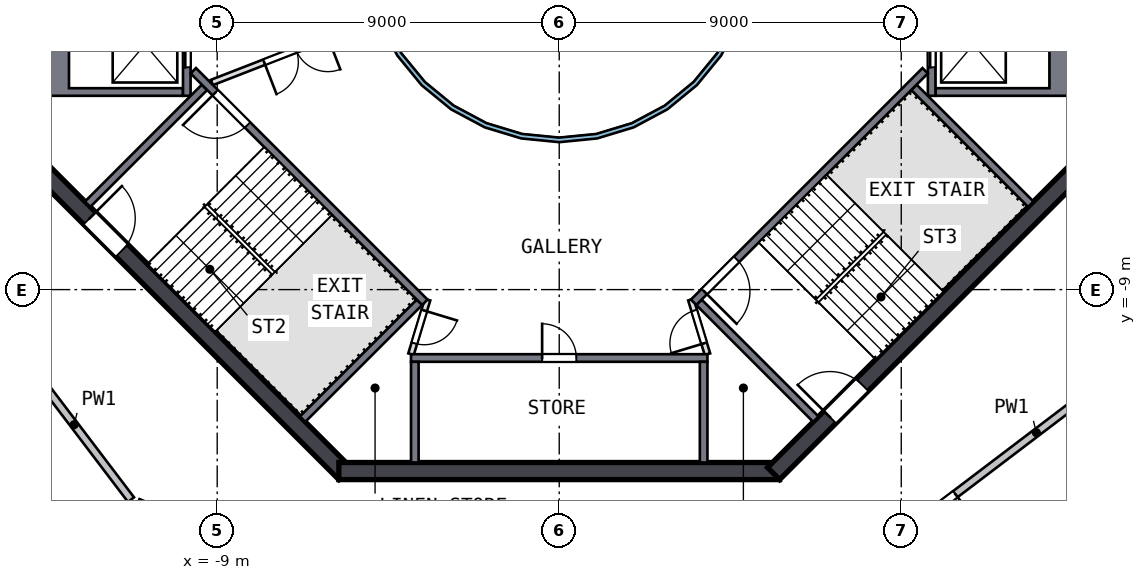
"""IFC4 building model, lengths in metres.
Left out: names, types, materials, properties, quantities, classifications, styles, units other than length and angle.
Written with IfcOpenShell. Run it as: python <this file> out.ifc"""

import sys

from ifc_helpers import new_model, si_unit, direction, frame, frame_2d, origin, place, context, subcontext, project, spatial, polyline, rectangle, outline, extrude, element, fill, save


model = new_model("IFC4")
c1 = context("Model", 3, precision=1e-05, world=origin(), true_north=direction((0.0, 1.0)))
c2 = subcontext(c1, "Body", "Model", "MODEL_VIEW")
j1 = project(units=[si_unit("LENGTHUNIT", "METRE"), si_unit("PLANEANGLEUNIT", "RADIAN")], contexts=[c1])
p1 = place(None, origin())
s1 = spatial("IfcSite", under=j1, at=p1, CompositionType="ELEMENT")
p2 = place(p1, origin())
s2 = spatial("IfcBuilding", under=s1, at=p2, CompositionType="ELEMENT")
p3 = place(p2, frame((0.0, 0.0, 306.5)))
s3 = spatial("IfcBuildingStorey", under=s2, at=p3, CompositionType="ELEMENT", Elevation=306.5)
p4 = place(p3, frame((-13.841, -5.64, 0.0), z_axis=(0.0, 0.0, 1.0), x_axis=(0.707106781, -0.707106781, 0.0)))
e1 = element("IfcWall", 1, at=p4, inside=s3, PredefinedType="SHEAR", context=c2, shape_type="SweptSolid", body=[
    extrude(rectangle(XDim=11.598, YDim=0.45, at=frame_2d((5.799, 0.0))), origin(), (0.0, 0.0, 1.0), 3.5),
])
p5 = place(p4, frame((2.099, 0.0, 0.0)))
e2 = element("IfcOpeningElement", 2, at=p5, cuts=e1, PredefinedType="OPENING", context=c2, shape_type="SweptSolid", body=[
    extrude(rectangle(XDim=1.2, YDim=2.1, at=frame_2d((0.6, 1.05))), frame((0.0, 0.235, 0.0), z_axis=(0.0, -1.0, 0.0), x_axis=(1.0, 0.0, 0.0)), (0.0, 0.0, 1.0), 0.47),
])
p6 = place(p3, frame((-5.799, -13.775, 0.0), z_axis=(0.0, 0.0, 1.0), x_axis=(1.0, 0.0, 0.0)))
e3 = element("IfcWall", 3, at=p6, inside=s3, PredefinedType="SHEAR", context=c2, shape_type="SweptSolid", body=[
    extrude(rectangle(XDim=11.598, YDim=0.45, at=frame_2d((5.799, 0.0))), origin(), (0.0, 0.0, 1.0), 3.5),
])
p7 = place(p3, frame((5.64, -13.841, 0.0), z_axis=(0.0, 0.0, 1.0), x_axis=(0.707106781, 0.707106781, 0.0)))
e4 = element("IfcWall", 4, at=p7, inside=s3, PredefinedType="SHEAR", context=c2, shape_type="SweptSolid", body=[
    extrude(rectangle(XDim=11.598, YDim=0.45, at=frame_2d((5.799, 0.0))), origin(), (0.0, 0.0, 1.0), 3.5),
])
p8 = place(p7, frame((2.099, 0.0, 0.0)))
e5 = element("IfcOpeningElement", 5, at=p8, cuts=e4, PredefinedType="OPENING", context=c2, shape_type="SweptSolid", body=[
    extrude(rectangle(XDim=1.2, YDim=2.1, at=frame_2d((0.6, 1.05))), frame((0.0, 0.235, 0.0), z_axis=(0.0, -1.0, 0.0), x_axis=(1.0, 0.0, 0.0)), (0.0, 0.0, 1.0), 0.47),
])
p9 = place(p3, origin())
e6 = element("IfcWall", 6, at=p9, inside=s3, PredefinedType="SOLIDWALL", context=c2, shape_type="SweptSolid", body=[
    extrude(outline(polyline([(13.55, -3.9), (9.9, -3.9), (9.9, -3.7), (12.9, -3.7), (12.9, -1.4), (9.9, -1.4), (9.9, -1.2), (13.55, -1.2), (13.55, -3.9)])), origin(), (0.0, 0.0, 1.0), 3.19),
])
p10 = place(p3, frame((9.8, -1.2, 0.0), z_axis=(0.0, 0.0, 1.0), x_axis=(0.0, -1.0, 0.0)))
e7 = element("IfcWall", 7, at=p10, inside=s3, PredefinedType="SOLIDWALL", context=c2, shape_type="SweptSolid", body=[
    extrude(rectangle(XDim=2.7, YDim=0.2, at=frame_2d((1.35, 0.0))), origin(), (0.0, 0.0, 1.0), 3.19),
])
p11 = place(p10, frame((0.75, 0.0, 0.0)))
e8 = element("IfcOpeningElement", 8, at=p11, cuts=e7, PredefinedType="OPENING", context=c2, shape_type="SweptSolid", body=[
    extrude(rectangle(XDim=1.2, YDim=2.1, at=frame_2d((0.6, 1.05))), frame((0.0, 0.11, 0.0), z_axis=(0.0, -1.0, 0.0), x_axis=(1.0, 0.0, 0.0)), (0.0, 0.0, 1.0), 0.22),
])
p12 = place(p3, origin())
e9 = element("IfcWall", 9, at=p12, inside=s3, PredefinedType="SOLIDWALL", context=c2, shape_type="SweptSolid", body=[
    extrude(outline(polyline([(-13.55, -3.9), (-13.55, -1.2), (-9.9, -1.2), (-9.9, -1.4), (-12.9, -1.4), (-12.9, -3.7), (-9.9, -3.7), (-9.9, -3.9), (-13.55, -3.9)])), origin(), (0.0, 0.0, 1.0), 3.19),
])
p13 = place(p3, frame((-9.8, -1.2, 0.0), z_axis=(0.0, 0.0, 1.0), x_axis=(0.0, -1.0, 0.0)))
e10 = element("IfcWall", 10, at=p13, inside=s3, PredefinedType="SOLIDWALL", context=c2, shape_type="SweptSolid", body=[
    extrude(rectangle(XDim=2.7, YDim=0.2, at=frame_2d((1.35, 0.0))), origin(), (0.0, 0.0, 1.0), 3.19),
])
p14 = place(p13, frame((0.75, 0.0, 0.0)))
e11 = element("IfcOpeningElement", 11, at=p14, cuts=e10, PredefinedType="OPENING", context=c2, shape_type="SweptSolid", body=[
    extrude(rectangle(XDim=1.2, YDim=2.1, at=frame_2d((0.6, 1.05))), frame((0.0, 0.11, 0.0), z_axis=(0.0, -1.0, 0.0), x_axis=(1.0, 0.0, 0.0)), (0.0, 0.0, 1.0), 0.22),
])
p15 = place(p3, frame((-3.9, -10.8, 0.0), z_axis=(0.0, 0.0, 1.0), x_axis=(1.0, 0.0, 0.0)))
e12 = element("IfcWall", 12, at=p15, inside=s3, PredefinedType="SOLIDWALL", context=c2, shape_type="SweptSolid", body=[
    extrude(rectangle(XDim=7.8, YDim=0.2, at=frame_2d((3.9, 0.0))), origin(), (0.0, 0.0, 1.0), 3.19),
])
p16 = place(p15, frame((3.45, 0.0, 0.0)))
e13 = element("IfcOpeningElement", 13, at=p16, cuts=e12, PredefinedType="OPENING", context=c2, shape_type="SweptSolid", body=[
    extrude(rectangle(XDim=0.9, YDim=2.1, at=frame_2d((0.45, 1.05))), frame((0.0, 0.11, 0.0), z_axis=(0.0, -1.0, 0.0), x_axis=(1.0, 0.0, 0.0)), (0.0, 0.0, 1.0), 0.22),
])
for number, where, z_axis, x_axis in (
    (14, (-3.8, -10.9, 0.0), (0.0, 0.0, 1.0), (0.0, -1.0, 0.0)),
    (15, (3.8, -10.9, 0.0), (0.0, 0.0, 1.0), (0.0, -1.0, 0.0)),
):
    element("IfcWall", number, at=place(p3, frame(where, z_axis=z_axis, x_axis=x_axis)), inside=s3, PredefinedType="SOLIDWALL", context=c2, shape_type="SweptSolid", body=[
        extrude(rectangle(XDim=2.65, YDim=0.2, at=frame_2d((1.325, 0.0))), origin(), (0.0, 0.0, 1.0), 3.19),
    ])
p17 = place(p3, frame((-3.535, -9.334, 0.0), z_axis=(0.0, 0.0, 1.0), x_axis=(-0.707120946, 0.707092617, 0.0)))
e16 = element("IfcWall", 16, at=p17, inside=s3, PredefinedType="SOLIDWALL", context=c2, shape_type="SweptSolid", body=[
    extrude(rectangle(XDim=8.618, YDim=0.2, at=frame_2d((4.309, 0.0))), origin(), (0.0, 0.0, 1.0), 3.19),
])
p18 = place(p17, frame((6.6, 0.0, 0.0)))
e17 = element("IfcOpeningElement", 17, at=p18, cuts=e16, PredefinedType="OPENING", context=c2, shape_type="SweptSolid", body=[
    extrude(rectangle(XDim=1.2, YDim=2.1, at=frame_2d((0.6, 1.05))), frame((0.0, 0.11, 0.0), z_axis=(0.0, -1.0, 0.0), x_axis=(1.0, 0.0, 0.0)), (0.0, 0.0, 1.0), 0.22),
])
for number, where, z_axis, x_axis in (
    (18, (-9.334, -3.677, 0.0), (0.0, 0.0, 1.0), (-0.707, -0.707, 0.0)),
    (19, (-3.677, -9.334, 0.0), (0.0, 0.0, 1.0), (-0.707, -0.707, 0.0)),
):
    element("IfcWall", number, at=place(p3, frame(where, z_axis=z_axis, x_axis=x_axis)), inside=s3, PredefinedType="SOLIDWALL", context=c2, shape_type="SweptSolid", body=[
        extrude(rectangle(XDim=4.35, YDim=0.2, at=frame_2d((2.175, 0.0))), origin(), (0.0, 0.0, 1.0), 3.19),
    ])
p19 = place(p3, frame((9.629, -3.24, 0.0), z_axis=(0.0, 0.0, 1.0), x_axis=(-0.707120946, -0.707092617, 0.0)))
e20 = element("IfcWall", 20, at=p19, inside=s3, PredefinedType="SOLIDWALL", context=c2, shape_type="SweptSolid", body=[
    extrude(rectangle(XDim=8.618, YDim=0.2, at=frame_2d((4.309, 0.0))), origin(), (0.0, 0.0, 1.0), 3.19),
])
p20 = place(p19, frame((7.018, 0.0, 0.0)))
e21 = element("IfcOpeningElement", 21, at=p20, cuts=e20, PredefinedType="OPENING", context=c2, shape_type="SweptSolid", body=[
    extrude(rectangle(XDim=1.2, YDim=2.1, at=frame_2d((0.6, 1.05))), frame((0.0, 0.11, 0.0), z_axis=(0.0, -1.0, 0.0), x_axis=(1.0, 0.0, 0.0)), (0.0, 0.0, 1.0), 0.22),
])
for number, where, z_axis, x_axis in (
    (22, (3.677, -9.334, 0.0), (0.0, 0.0, 1.0), (0.707, -0.707, 0.0)),
    (23, (9.334, -3.677, 0.0), (0.0, 0.0, 1.0), (0.707, -0.707, 0.0)),
):
    element("IfcWall", number, at=place(p3, frame(where, z_axis=z_axis, x_axis=x_axis)), inside=s3, PredefinedType="SOLIDWALL", context=c2, shape_type="SweptSolid", body=[
        extrude(rectangle(XDim=4.35, YDim=0.2, at=frame_2d((2.175, 0.0))), origin(), (0.0, 0.0, 1.0), 3.19),
    ])
p21 = place(p3, frame((-3.465, -9.263, 0.0), z_axis=(0.0, 0.0, 1.0), x_axis=(-0.289808785, -0.957084567, 0.0)))
e24 = element("IfcWall", 24, at=p21, inside=s3, PredefinedType="PARTITIONING", context=c2, shape_type="SweptSolid", body=[
    extrude(rectangle(XDim=1.501, YDim=0.15, at=frame_2d((0.75, 0.0))), origin(), (0.0, 0.0, 1.0), 3.19),
])
p22 = place(p21, frame((0.301, 0.0, 0.0)))
e25 = element("IfcOpeningElement", 25, at=p22, cuts=e24, PredefinedType="OPENING", context=c2, shape_type="SweptSolid", body=[
    extrude(rectangle(XDim=0.9, YDim=2.1, at=frame_2d((0.45, 1.05))), frame((0.0, 0.085, 0.0), z_axis=(0.0, -1.0, 0.0), x_axis=(1.0, 0.0, 0.0)), (0.0, 0.0, 1.0), 0.17),
])
p23 = place(p3, frame((3.9, -10.7, 0.0), z_axis=(0.0, 0.0, 1.0), x_axis=(-0.289808785, 0.957084567, 0.0)))
e26 = element("IfcWall", 26, at=p23, inside=s3, PredefinedType="PARTITIONING", context=c2, shape_type="SweptSolid", body=[
    extrude(rectangle(XDim=1.501, YDim=0.15, at=frame_2d((0.75, 0.0))), origin(), (0.0, 0.0, 1.0), 3.19),
])
p24 = place(p23, frame((0.301, 0.0, 0.0)))
e27 = element("IfcOpeningElement", 27, at=p24, cuts=e26, PredefinedType="OPENING", context=c2, shape_type="SweptSolid", body=[
    extrude(rectangle(XDim=0.9, YDim=2.1, at=frame_2d((0.45, 1.05))), frame((0.0, 0.085, 0.0), z_axis=(0.0, -1.0, 0.0), x_axis=(1.0, 0.0, 0.0)), (0.0, 0.0, 1.0), 0.17),
])
p25 = place(p3, frame((-4.782, -1.857, 0.0), z_axis=(0.0, 0.0, 1.0), x_axis=(-0.932167228, -0.36202798, 0.0)))
e28 = element("IfcWall", 28, at=p25, inside=s3, PredefinedType="PARTITIONING", context=c2, shape_type="SweptSolid", body=[
    extrude(rectangle(XDim=4.676, YDim=0.15, at=frame_2d((2.338, 0.0))), origin(), (0.0, 0.0, 1.0), 3.19),
])
p26 = place(p25, frame((1.4, 0.0, 0.0)))
e29 = element("IfcOpeningElement", 29, at=p26, cuts=e28, PredefinedType="OPENING", context=c2, shape_type="SweptSolid", body=[
    extrude(rectangle(XDim=1.8, YDim=2.1, at=frame_2d((0.9, 1.05))), frame((0.0, 0.085, 0.0), z_axis=(0.0, -1.0, 0.0), x_axis=(1.0, 0.0, 0.0)), (0.0, 0.0, 1.0), 0.17),
])
p27 = place(p3, origin())
e30 = element("IfcWall", 30, at=p27, inside=s3, PredefinedType="SOLIDWALL", context=c2, shape_type="SweptSolid", body=[
    extrude(outline(polyline([(5.021, -0.999), (4.73, -1.959), (4.257, -2.844), (3.62, -3.62), (2.844, -4.257), (1.959, -4.73), (0.999, -5.021), (0.0, -5.12), (-0.999, -5.021), (-1.959, -4.73), (-2.844, -4.257), (-3.62, -3.62), (-4.257, -2.844), (-4.73, -1.959), (-5.021, -0.999), (-5.12, 0.0), (-5.021, 0.999), (-4.73, 1.959), (-4.257, 2.844), (-3.62, 3.62), (-2.844, 4.257), (-1.959, 4.73), (-0.999, 5.021), (0.0, 5.12), (0.999, 5.021), (1.959, 4.73), (2.844, 4.257), (3.62, 3.62), (4.257, 2.844), (4.73, 1.959), (5.021, 0.999), (5.12, 0.0), (5.021, -0.999)]), holes=[polyline([(4.904, 0.976), (4.619, 1.913), (4.157, 2.778), (3.535, 3.535), (2.778, 4.157), (1.913, 4.619), (0.976, 4.904), (0.0, 5.0), (-0.976, 4.904), (-1.913, 4.619), (-2.778, 4.157), (-3.535, 3.535), (-4.157, 2.778), (-4.619, 1.913), (-4.904, 0.976), (-5.0, 0.0), (-4.904, -0.976), (-4.619, -1.913), (-4.157, -2.778), (-3.535, -3.535), (-2.778, -4.157), (-1.913, -4.619), (-0.976, -4.904), (0.0, -5.0), (0.976, -4.904), (1.913, -4.619), (2.778, -4.157), (3.535, -3.535), (4.157, -2.778), (4.619, -1.913), (4.904, -0.976), (5.0, 0.0), (4.904, 0.976)])]), origin(), (0.0, 0.0, 1.0), 3.19),
])
p28 = place(p3, frame((-11.268, -14.527, 0.0), z_axis=(0.0, 0.0, 1.0), x_axis=(-0.604585485, 0.796540263, 0.0)))
e31 = element("IfcWall", 31, at=p28, inside=s3, PredefinedType="SOLIDWALL", context=c2, shape_type="SweptSolid", body=[
    extrude(rectangle(XDim=9.316, YDim=0.2, at=frame_2d((4.658, 0.0))), origin(), (0.0, 0.0, 1.0), 3.19),
])
p29 = place(p28, frame((5.15, 0.0, 0.0)))
e32 = element("IfcOpeningElement", 32, at=p29, cuts=e31, PredefinedType="OPENING", context=c2, shape_type="SweptSolid", body=[
    extrude(rectangle(XDim=1.0, YDim=2.1, at=frame_2d((0.5, 1.05))), frame((0.0, 0.11, 0.0), z_axis=(0.0, -1.0, 0.0), x_axis=(1.0, 0.0, 0.0)), (0.0, 0.0, 1.0), 0.22),
])
p30 = place(p3, frame((-2.495, -18.215, 0.0), z_axis=(0.0, 0.0, 1.0), x_axis=(-0.921862121, 0.387518038, 0.0)))
e33 = element("IfcWall", 33, at=p30, inside=s3, PredefinedType="SOLIDWALL", context=c2, shape_type="SweptSolid", body=[
    extrude(rectangle(XDim=9.317, YDim=0.2, at=frame_2d((4.658, 0.0))), origin(), (0.0, 0.0, 1.0), 3.19),
])
p31 = place(p30, frame((5.15, 0.0, 0.0)))
e34 = element("IfcOpeningElement", 34, at=p31, cuts=e33, PredefinedType="OPENING", context=c2, shape_type="SweptSolid", body=[
    extrude(rectangle(XDim=1.0, YDim=2.1, at=frame_2d((0.5, 1.05))), frame((0.0, 0.11, 0.0), z_axis=(0.0, -1.0, 0.0), x_axis=(1.0, 0.0, 0.0)), (0.0, 0.0, 1.0), 0.22),
])
p32 = place(p3, frame((14.526, -11.269, 0.0), z_axis=(0.0, 0.0, 1.0), x_axis=(-0.796533725, -0.604594099, 0.0)))
e35 = element("IfcWall", 35, at=p32, inside=s3, PredefinedType="SOLIDWALL", context=c2, shape_type="SweptSolid", body=[
    extrude(rectangle(XDim=9.316, YDim=0.2, at=frame_2d((4.658, 0.0))), origin(), (0.0, 0.0, 1.0), 3.19),
])
p33 = place(p32, frame((5.15, 0.0, 0.0)))
e36 = element("IfcOpeningElement", 36, at=p33, cuts=e35, PredefinedType="OPENING", context=c2, shape_type="SweptSolid", body=[
    extrude(rectangle(XDim=1.0, YDim=2.1, at=frame_2d((0.5, 1.05))), frame((0.0, 0.11, 0.0), z_axis=(0.0, -1.0, 0.0), x_axis=(1.0, 0.0, 0.0)), (0.0, 0.0, 1.0), 0.22),
])
p34 = place(p16, origin())
e37 = element("IfcDoor", 37, at=p34, inside=s3, OperationType="SINGLE_SWING_LEFT", PredefinedType="DOOR", context=c2, shape_type="SweptSolid", body=[
    extrude(rectangle(XDim=0.9, YDim=2.1, at=frame_2d((0.45, 1.05))), frame((0.0, 0.025, 0.0), z_axis=(0.0, -1.0, 0.0), x_axis=(1.0, 0.0, 0.0)), (0.0, 0.0, 1.0), 0.05),
])
fill(e13, e37)
p35 = place(p11, origin())
e38 = element("IfcDoor", 38, at=p35, inside=s3, OperationType="DOUBLE_DOOR_SLIDING", PredefinedType="DOOR", context=c2, shape_type="SweptSolid", body=[
    extrude(rectangle(XDim=1.2, YDim=2.1, at=frame_2d((0.6, 1.05))), frame((0.0, 0.025, 0.0), z_axis=(0.0, -1.0, 0.0), x_axis=(1.0, 0.0, 0.0)), (0.0, 0.0, 1.0), 0.05),
])
fill(e8, e38)
p36 = place(p14, origin())
e39 = element("IfcDoor", 39, at=p36, inside=s3, OperationType="DOUBLE_DOOR_SLIDING", PredefinedType="DOOR", context=c2, shape_type="SweptSolid", body=[
    extrude(rectangle(XDim=1.2, YDim=2.1, at=frame_2d((0.6, 1.05))), frame((0.0, 0.025, 0.0), z_axis=(0.0, -1.0, 0.0), x_axis=(1.0, 0.0, 0.0)), (0.0, 0.0, 1.0), 0.05),
])
fill(e11, e39)
p37 = place(p18, origin())
e40 = element("IfcDoor", 40, at=p37, inside=s3, OperationType="SINGLE_SWING_RIGHT", PredefinedType="DOOR", context=c2, shape_type="SweptSolid", body=[
    extrude(rectangle(XDim=1.2, YDim=2.1, at=frame_2d((0.6, 1.05))), frame((0.0, 0.025, 0.0), z_axis=(0.0, -1.0, 0.0), x_axis=(1.0, 0.0, 0.0)), (0.0, 0.0, 1.0), 0.05),
])
fill(e17, e40)
p38 = place(p20, origin())
e41 = element("IfcDoor", 41, at=p38, inside=s3, OperationType="SINGLE_SWING_RIGHT", PredefinedType="DOOR", context=c2, shape_type="SweptSolid", body=[
    extrude(rectangle(XDim=1.2, YDim=2.1, at=frame_2d((0.6, 1.05))), frame((0.0, 0.025, 0.0), z_axis=(0.0, -1.0, 0.0), x_axis=(1.0, 0.0, 0.0)), (0.0, 0.0, 1.0), 0.05),
])
fill(e21, e41)
p39 = place(p5, origin())
e42 = element("IfcDoor", 42, at=p39, inside=s3, OperationType="SINGLE_SWING_LEFT", PredefinedType="DOOR", context=c2, shape_type="SweptSolid", body=[
    extrude(rectangle(XDim=1.2, YDim=2.1, at=frame_2d((0.6, 1.05))), frame((0.0, 0.025, 0.0), z_axis=(0.0, -1.0, 0.0), x_axis=(1.0, 0.0, 0.0)), (0.0, 0.0, 1.0), 0.05),
])
fill(e2, e42)
p40 = place(p8, origin())
e43 = element("IfcDoor", 43, at=p40, inside=s3, OperationType="SINGLE_SWING_LEFT", PredefinedType="DOOR", context=c2, shape_type="SweptSolid", body=[
    extrude(rectangle(XDim=1.2, YDim=2.1, at=frame_2d((0.6, 1.05))), frame((0.0, 0.025, 0.0), z_axis=(0.0, -1.0, 0.0), x_axis=(1.0, 0.0, 0.0)), (0.0, 0.0, 1.0), 0.05),
])
fill(e5, e43)
p41 = place(p22, origin())
e44 = element("IfcDoor", 44, at=p41, inside=s3, OperationType="SINGLE_SWING_LEFT", PredefinedType="DOOR", context=c2, shape_type="SweptSolid", body=[
    extrude(rectangle(XDim=0.9, YDim=2.1, at=frame_2d((0.45, 1.05))), frame((0.0, 0.025, 0.0), z_axis=(0.0, -1.0, 0.0), x_axis=(1.0, 0.0, 0.0)), (0.0, 0.0, 1.0), 0.05),
])
fill(e25, e44)
p42 = place(p24, origin())
e45 = element("IfcDoor", 45, at=p42, inside=s3, OperationType="SINGLE_SWING_LEFT", PredefinedType="DOOR", context=c2, shape_type="SweptSolid", body=[
    extrude(rectangle(XDim=0.9, YDim=2.1, at=frame_2d((0.45, 1.05))), frame((0.0, 0.025, 0.0), z_axis=(0.0, -1.0, 0.0), x_axis=(1.0, 0.0, 0.0)), (0.0, 0.0, 1.0), 0.05),
])
fill(e27, e45)
p43 = place(p26, origin())
e46 = element("IfcDoor", 46, at=p43, inside=s3, OperationType="DOUBLE_DOOR_SINGLE_SWING", PredefinedType="DOOR", context=c2, shape_type="SweptSolid", body=[
    extrude(rectangle(XDim=1.8, YDim=2.1, at=frame_2d((0.9, 1.05))), frame((0.0, 0.025, 0.0), z_axis=(0.0, -1.0, 0.0), x_axis=(1.0, 0.0, 0.0)), (0.0, 0.0, 1.0), 0.05),
])
fill(e29, e46)
p44 = place(p33, origin())
e47 = element("IfcDoor", 47, at=p44, inside=s3, OperationType="SINGLE_SWING_LEFT", PredefinedType="DOOR", context=c2, shape_type="SweptSolid", body=[
    extrude(rectangle(XDim=1.0, YDim=2.1, at=frame_2d((0.5, 1.05))), frame((0.0, 0.025, 0.0), z_axis=(0.0, -1.0, 0.0), x_axis=(1.0, 0.0, 0.0)), (0.0, 0.0, 1.0), 0.05),
])
fill(e36, e47)
save(model, sys.argv[1])
